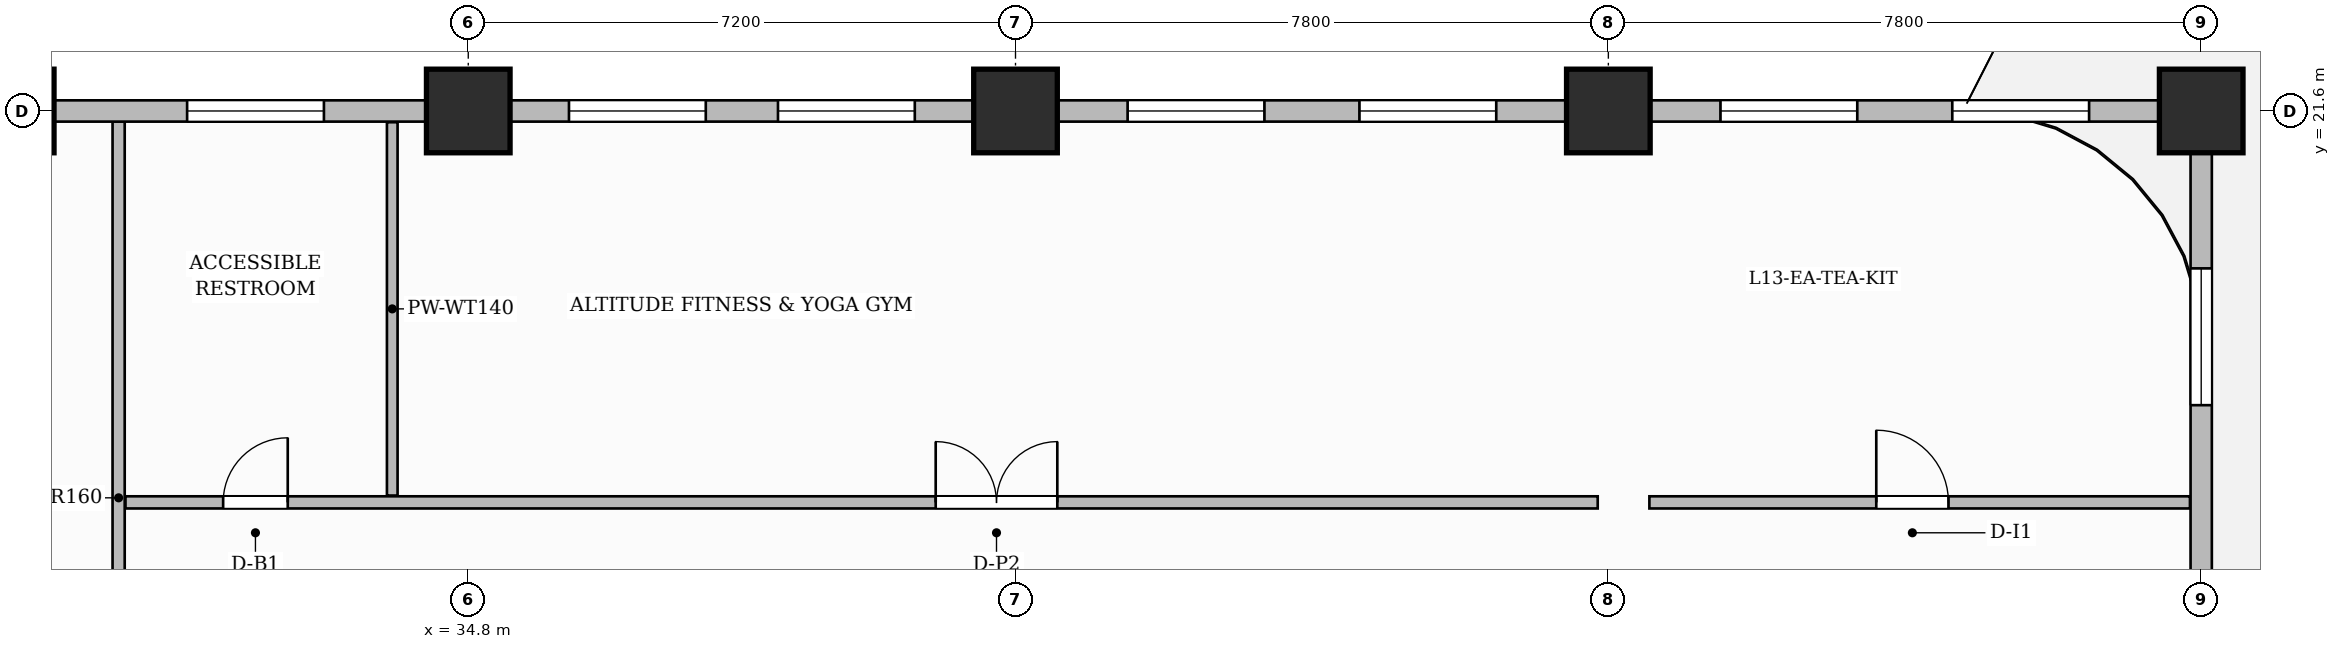
"""IFC4 building model, lengths in metres.
Left out: names, types, materials, properties, quantities, classifications, styles, units other than length and angle.
Written with IfcOpenShell. Run it as: python <this file> out.ifc"""

import sys

from ifc_helpers import new_model, si_unit, direction, frame, frame_2d, origin, origin_2d, place, context, subcontext, project, spatial, rectangle, extrude, source, transform, mapped, element, fill, save


model = new_model("IFC4")
c1 = context("Model", 3, precision=1e-05, world=origin(), true_north=direction((0.0, 1.0)))
c2 = subcontext(c1, "Body", "Model", "MODEL_VIEW")
j1 = project(units=[si_unit("LENGTHUNIT", "METRE"), si_unit("PLANEANGLEUNIT", "RADIAN")], contexts=[c1])
p1 = place(None, origin())
s1 = spatial("IfcSite", under=j1, at=p1, CompositionType="ELEMENT")
p2 = place(p1, origin())
s2 = spatial("IfcBuilding", under=s1, at=p2, CompositionType="ELEMENT")
p3 = place(p2, frame((0.0, 0.0, 58.3)))
s3 = spatial("IfcBuildingStorey", under=s2, at=p3, CompositionType="ELEMENT", Elevation=58.3)
m1 = source(origin(), c2, "Body", "SweptSolid", [
    extrude(rectangle(XDim=1.1, YDim=1.1, at=origin_2d()), origin(), (0.0, 0.0, 1.0), 3.7),
])
for number, where, z_axis, x_axis in (
    (1, (28.8, 21.6, 0.0), (0.0, 0.0, 1.0), (1.0, 0.0, 0.0)),
    (2, (34.8, 21.6, 0.0), (0.0, 0.0, 1.0), (1.0, 0.0, 0.0)),
    (3, (42.0, 21.6, 0.0), (0.0, 0.0, 1.0), (1.0, 0.0, 0.0)),
    (4, (49.8, 21.6, 0.0), (0.0, 0.0, 1.0), (1.0, 0.0, 0.0)),
    (5, (57.6, 21.6, 0.0), (0.0, 0.0, 1.0), (1.0, 0.0, 0.0)),
):
    element("IfcColumn", number, at=place(p3, frame(where, z_axis=z_axis, x_axis=x_axis)), inside=s3, PredefinedType="COLUMN", context=c2, shape_type="MappedRepresentation", body=[
        mapped(m1, transform((0.0, 0.0, 0.0), scale=1.0)),
    ])
p4 = place(p3, frame((30.2, 11.56, 0.0), z_axis=(0.0, 0.0, 1.0), x_axis=(0.0, 1.0, 0.0)))
e6 = element("IfcWall", 6, at=p4, inside=s3, PredefinedType="PARTITIONING", context=c2, shape_type="SweptSolid", body=[
    extrude(rectangle(XDim=9.9, YDim=0.16, at=frame_2d((4.95, 0.0))), origin(), (0.0, 0.0, 1.0), 3.45),
])
p5 = place(p3, frame((30.29, 16.45, 0.0), z_axis=(0.0, 0.0, 1.0), x_axis=(1.0, 0.0, 0.0)))
e7 = element("IfcWall", 7, at=p5, inside=s3, PredefinedType="PARTITIONING", context=c2, shape_type="SweptSolid", body=[
    extrude(rectangle(XDim=19.37, YDim=0.16, at=frame_2d((9.685, 0.0))), origin(), (0.0, 0.0, 1.0), 3.45),
])
p6 = place(p5, frame((1.285, 0.0, 0.0)))
e8 = element("IfcOpeningElement", 8, at=p6, cuts=e7, PredefinedType="OPENING", context=c2, shape_type="SweptSolid", body=[
    extrude(rectangle(XDim=0.85, YDim=2.1, at=frame_2d((0.425, 1.05))), frame((0.0, 0.09, 0.0), z_axis=(0.0, -1.0, 0.0), x_axis=(1.0, 0.0, 0.0)), (0.0, 0.0, 1.0), 0.18),
])
p7 = place(p5, frame((10.66, 0.0, 0.0)))
e9 = element("IfcOpeningElement", 9, at=p7, cuts=e7, PredefinedType="OPENING", context=c2, shape_type="SweptSolid", body=[
    extrude(rectangle(XDim=1.6, YDim=2.4, at=frame_2d((0.8, 1.2))), frame((0.0, 0.09, 0.0), z_axis=(0.0, -1.0, 0.0), x_axis=(1.0, 0.0, 0.0)), (0.0, 0.0, 1.0), 0.18),
])
p8 = place(p3, frame((50.34, 16.45, 0.0), z_axis=(0.0, 0.0, 1.0), x_axis=(1.0, 0.0, 0.0)))
e10 = element("IfcWall", 10, at=p8, inside=s3, PredefinedType="PARTITIONING", context=c2, shape_type="SweptSolid", body=[
    extrude(rectangle(XDim=7.112, YDim=0.16, at=frame_2d((3.556, 0.0))), origin(), (0.0, 0.0, 1.0), 3.45),
])
p9 = place(p8, frame((2.985, 0.0, 0.0)))
e11 = element("IfcOpeningElement", 11, at=p9, cuts=e10, PredefinedType="OPENING", context=c2, shape_type="SweptSolid", body=[
    extrude(rectangle(XDim=0.95, YDim=2.15, at=frame_2d((0.475, 1.075))), frame((0.0, 0.09, 0.0), z_axis=(0.0, -1.0, 0.0), x_axis=(1.0, 0.0, 0.0)), (0.0, 0.0, 1.0), 0.18),
])
p10 = place(p3, frame((33.8, 16.54, 0.0), z_axis=(0.0, 0.0, 1.0), x_axis=(0.0, 1.0, 0.0)))
e12 = element("IfcWall", 12, at=p10, inside=s3, PredefinedType="PARTITIONING", context=c2, shape_type="SweptSolid", body=[
    extrude(rectangle(XDim=4.912, YDim=0.14, at=frame_2d((2.456, 0.0))), origin(), (0.0, 0.0, 1.0), 3.45),
])
p11 = place(p3, frame((57.6, 0.05, 0.0), z_axis=(0.0, 0.0, 1.0), x_axis=(0.0, 1.0, 0.0)))
e13 = element("IfcWall", 13, at=p11, inside=s3, PredefinedType="SOLIDWALL", context=c2, shape_type="SweptSolid", body=[
    extrude(rectangle(XDim=21.5, YDim=0.28, at=frame_2d((10.75, 0.0))), origin(), (0.0, 0.0, 1.0), 2.885),
])
p12 = place(p11, frame((2.75, 0.0, 0.0)))
e14 = element("IfcOpeningElement", 14, at=p12, cuts=e13, PredefinedType="OPENING", context=c2, shape_type="SweptSolid", body=[
    extrude(rectangle(XDim=1.2, YDim=2.2, at=frame_2d((0.6, 1.1))), frame((0.0, 0.15, 0.0), z_axis=(0.0, -1.0, 0.0), x_axis=(1.0, 0.0, 0.0)), (0.0, 0.0, 1.0), 0.3),
])
p13 = place(p11, frame((1.025, 0.0, 0.8)))
e15 = element("IfcOpeningElement", 15, at=p13, cuts=e13, PredefinedType="OPENING", context=c2, shape_type="SweptSolid", body=[
    extrude(rectangle(XDim=1.15, YDim=1.8, at=frame_2d((0.575, 0.9))), frame((0.0, 0.15, 0.0), z_axis=(0.0, -1.0, 0.0), x_axis=(1.0, 0.0, 0.0)), (0.0, 0.0, 1.0), 0.3),
])
p14 = place(p11, frame((4.6, 0.0, 0.8)))
e16 = element("IfcOpeningElement", 16, at=p14, cuts=e13, PredefinedType="OPENING", context=c2, shape_type="SweptSolid", body=[
    extrude(rectangle(XDim=1.4, YDim=1.85, at=frame_2d((0.7, 0.925))), frame((0.0, 0.15, 0.0), z_axis=(0.0, -1.0, 0.0), x_axis=(1.0, 0.0, 0.0)), (0.0, 0.0, 1.0), 0.3),
])
p15 = place(p11, frame((8.475, 0.0, 0.8)))
e17 = element("IfcOpeningElement", 17, at=p15, cuts=e13, PredefinedType="OPENING", context=c2, shape_type="SweptSolid", body=[
    extrude(rectangle(XDim=1.8, YDim=1.85, at=frame_2d((0.9, 0.925))), frame((0.0, 0.15, 0.0), z_axis=(0.0, -1.0, 0.0), x_axis=(1.0, 0.0, 0.0)), (0.0, 0.0, 1.0), 0.3),
])
p16 = place(p11, frame((11.225, 0.0, 0.8)))
e18 = element("IfcOpeningElement", 18, at=p16, cuts=e13, PredefinedType="OPENING", context=c2, shape_type="SweptSolid", body=[
    extrude(rectangle(XDim=1.8, YDim=1.85, at=frame_2d((0.9, 0.925))), frame((0.0, 0.15, 0.0), z_axis=(0.0, -1.0, 0.0), x_axis=(1.0, 0.0, 0.0)), (0.0, 0.0, 1.0), 0.3),
])
p17 = place(p11, frame((17.679, 0.0, 0.8)))
e19 = element("IfcOpeningElement", 19, at=p17, cuts=e13, PredefinedType="OPENING", context=c2, shape_type="SweptSolid", body=[
    extrude(rectangle(XDim=1.8, YDim=1.85, at=frame_2d((0.9, 0.925))), frame((0.0, 0.15, 0.0), z_axis=(0.0, -1.0, 0.0), x_axis=(1.0, 0.0, 0.0)), (0.0, 0.0, 1.0), 0.3),
])
p18 = place(p3, frame((14.4, 21.6, 0.0), z_axis=(0.0, 0.0, 1.0), x_axis=(1.0, 0.0, 0.0)))
e20 = element("IfcWall", 20, at=p18, inside=s3, PredefinedType="SOLIDWALL", context=c2, shape_type="SweptSolid", body=[
    extrude(rectangle(XDim=43.2, YDim=0.28, at=frame_2d((21.6, 0.0))), origin(), (0.0, 0.0, 1.0), 2.885),
])
p19 = place(p18, frame((1.5, 0.0, 0.0)))
e21 = element("IfcOpeningElement", 21, at=p19, cuts=e20, PredefinedType="OPENING", context=c2, shape_type="SweptSolid", body=[
    extrude(rectangle(XDim=1.2, YDim=2.2, at=frame_2d((0.6, 1.1))), frame((0.0, 0.15, 0.0), z_axis=(0.0, -1.0, 0.0), x_axis=(1.0, 0.0, 0.0)), (0.0, 0.0, 1.0), 0.3),
])
p20 = place(p18, frame((3.8, 0.0, 0.8)))
e22 = element("IfcOpeningElement", 22, at=p20, cuts=e20, PredefinedType="OPENING", context=c2, shape_type="SweptSolid", body=[
    extrude(rectangle(XDim=1.8, YDim=1.85, at=frame_2d((0.9, 0.925))), frame((0.0, 0.15, 0.0), z_axis=(0.0, -1.0, 0.0), x_axis=(1.0, 0.0, 0.0)), (0.0, 0.0, 1.0), 0.3),
])
p21 = place(p18, frame((8.246, 0.0, 0.8)))
e23 = element("IfcOpeningElement", 23, at=p21, cuts=e20, PredefinedType="OPENING", context=c2, shape_type="SweptSolid", body=[
    extrude(rectangle(XDim=0.95, YDim=1.75, at=frame_2d((0.475, 0.875))), frame((0.0, 0.15, 0.0), z_axis=(0.0, -1.0, 0.0), x_axis=(1.0, 0.0, 0.0)), (0.0, 0.0, 1.0), 0.3),
])
p22 = place(p18, frame((10.629, 0.0, 0.8)))
e24 = element("IfcOpeningElement", 24, at=p22, cuts=e20, PredefinedType="OPENING", context=c2, shape_type="SweptSolid", body=[
    extrude(rectangle(XDim=1.8, YDim=1.85, at=frame_2d((0.9, 0.925))), frame((0.0, 0.15, 0.0), z_axis=(0.0, -1.0, 0.0), x_axis=(1.0, 0.0, 0.0)), (0.0, 0.0, 1.0), 0.3),
])
p23 = place(p18, frame((16.701, 0.0, 0.8)))
e25 = element("IfcOpeningElement", 25, at=p23, cuts=e20, PredefinedType="OPENING", context=c2, shape_type="SweptSolid", body=[
    extrude(rectangle(XDim=1.8, YDim=1.85, at=frame_2d((0.9, 0.925))), frame((0.0, 0.15, 0.0), z_axis=(0.0, -1.0, 0.0), x_axis=(1.0, 0.0, 0.0)), (0.0, 0.0, 1.0), 0.3),
])
p24 = place(p18, frame((21.725, 0.0, 0.8)))
e26 = element("IfcOpeningElement", 26, at=p24, cuts=e20, PredefinedType="OPENING", context=c2, shape_type="SweptSolid", body=[
    extrude(rectangle(XDim=1.8, YDim=1.85, at=frame_2d((0.9, 0.925))), frame((0.0, 0.15, 0.0), z_axis=(0.0, -1.0, 0.0), x_axis=(1.0, 0.0, 0.0)), (0.0, 0.0, 1.0), 0.3),
])
p25 = place(p18, frame((24.475, 0.0, 0.8)))
e27 = element("IfcOpeningElement", 27, at=p25, cuts=e20, PredefinedType="OPENING", context=c2, shape_type="SweptSolid", body=[
    extrude(rectangle(XDim=1.8, YDim=1.85, at=frame_2d((0.9, 0.925))), frame((0.0, 0.15, 0.0), z_axis=(0.0, -1.0, 0.0), x_axis=(1.0, 0.0, 0.0)), (0.0, 0.0, 1.0), 0.3),
])
p26 = place(p18, frame((29.075, 0.0, 0.8)))
e28 = element("IfcOpeningElement", 28, at=p26, cuts=e20, PredefinedType="OPENING", context=c2, shape_type="SweptSolid", body=[
    extrude(rectangle(XDim=1.8, YDim=1.85, at=frame_2d((0.9, 0.925))), frame((0.0, 0.15, 0.0), z_axis=(0.0, -1.0, 0.0), x_axis=(1.0, 0.0, 0.0)), (0.0, 0.0, 1.0), 0.3),
])
p27 = place(p18, frame((32.125, 0.0, 0.8)))
e29 = element("IfcOpeningElement", 29, at=p27, cuts=e20, PredefinedType="OPENING", context=c2, shape_type="SweptSolid", body=[
    extrude(rectangle(XDim=1.8, YDim=1.85, at=frame_2d((0.9, 0.925))), frame((0.0, 0.15, 0.0), z_axis=(0.0, -1.0, 0.0), x_axis=(1.0, 0.0, 0.0)), (0.0, 0.0, 1.0), 0.3),
])
p28 = place(p18, frame((36.875, 0.0, 0.8)))
e30 = element("IfcOpeningElement", 30, at=p28, cuts=e20, PredefinedType="OPENING", context=c2, shape_type="SweptSolid", body=[
    extrude(rectangle(XDim=1.8, YDim=1.85, at=frame_2d((0.9, 0.925))), frame((0.0, 0.15, 0.0), z_axis=(0.0, -1.0, 0.0), x_axis=(1.0, 0.0, 0.0)), (0.0, 0.0, 1.0), 0.3),
])
p29 = place(p18, frame((39.925, 0.0, 0.8)))
e31 = element("IfcOpeningElement", 31, at=p29, cuts=e20, PredefinedType="OPENING", context=c2, shape_type="SweptSolid", body=[
    extrude(rectangle(XDim=1.8, YDim=1.85, at=frame_2d((0.9, 0.925))), frame((0.0, 0.15, 0.0), z_axis=(0.0, -1.0, 0.0), x_axis=(1.0, 0.0, 0.0)), (0.0, 0.0, 1.0), 0.3),
])
m2 = source(origin(), c2, "Body", "SweptSolid", [
    extrude(rectangle(XDim=0.95, YDim=2.15, at=frame_2d((0.475, 1.075))), frame((0.0, 0.025, 0.0), z_axis=(0.0, -1.0, 0.0), x_axis=(1.0, 0.0, 0.0)), (0.0, 0.0, 1.0), 0.05),
])
p30 = place(p9, origin())
e32 = element("IfcDoor", 32, at=p30, inside=s3, OperationType="SINGLE_SWING_LEFT", PredefinedType="DOOR", context=c2, shape_type="MappedRepresentation", body=[
    mapped(m2, transform((0.0, 0.0, 0.0), scale=1.0)),
])
fill(e11, e32)
m3 = source(origin(), c2, "Body", "SweptSolid", [
    extrude(rectangle(XDim=0.85, YDim=2.1, at=frame_2d((0.425, 1.05))), frame((0.0, 0.025, 0.0), z_axis=(0.0, -1.0, 0.0), x_axis=(1.0, 0.0, 0.0)), (0.0, 0.0, 1.0), 0.05),
])
p31 = place(p6, origin())
e33 = element("IfcDoor", 33, at=p31, inside=s3, OperationType="SINGLE_SWING_RIGHT", PredefinedType="DOOR", context=c2, shape_type="MappedRepresentation", body=[
    mapped(m3, transform((0.0, 0.0, 0.0), scale=1.0)),
])
fill(e8, e33)
m4 = source(origin(), c2, "Body", "SweptSolid", [
    extrude(rectangle(XDim=1.6, YDim=2.4, at=frame_2d((0.8, 1.2))), frame((0.0, 0.025, 0.0), z_axis=(0.0, -1.0, 0.0), x_axis=(1.0, 0.0, 0.0)), (0.0, 0.0, 1.0), 0.05),
])
p32 = place(p7, origin())
e34 = element("IfcDoor", 34, at=p32, inside=s3, OperationType="DOUBLE_DOOR_SINGLE_SWING", PredefinedType="DOOR", context=c2, shape_type="MappedRepresentation", body=[
    mapped(m4, transform((0.0, 0.0, 0.0), scale=1.0)),
])
fill(e9, e34)
m5 = source(origin(), c2, "Body", "SweptSolid", [
    extrude(rectangle(XDim=1.8, YDim=1.85, at=frame_2d((0.9, 0.925))), frame((0.0, 0.03, 0.0), z_axis=(0.0, -1.0, 0.0), x_axis=(1.0, 0.0, 0.0)), (0.0, 0.0, 1.0), 0.06),
])
p33 = place(p17, origin())
e35 = element("IfcWindow", 35, at=p33, inside=s3, PartitioningType="DOUBLE_PANEL_VERTICAL", PredefinedType="WINDOW", context=c2, shape_type="MappedRepresentation", body=[
    mapped(m5, transform((0.0, 0.0, 0.0), scale=1.0)),
])
fill(e19, e35)
p34 = place(p23, origin())
e36 = element("IfcWindow", 36, at=p34, inside=s3, PartitioningType="DOUBLE_PANEL_VERTICAL", PredefinedType="WINDOW", context=c2, shape_type="MappedRepresentation", body=[
    mapped(m5, transform((0.0, 0.0, 0.0), scale=1.0)),
])
fill(e25, e36)
p35 = place(p24, origin())
e37 = element("IfcWindow", 37, at=p35, inside=s3, PartitioningType="DOUBLE_PANEL_VERTICAL", PredefinedType="WINDOW", context=c2, shape_type="MappedRepresentation", body=[
    mapped(m5, transform((0.0, 0.0, 0.0), scale=1.0)),
])
fill(e26, e37)
p36 = place(p25, origin())
e38 = element("IfcWindow", 38, at=p36, inside=s3, PartitioningType="DOUBLE_PANEL_VERTICAL", PredefinedType="WINDOW", context=c2, shape_type="MappedRepresentation", body=[
    mapped(m5, transform((0.0, 0.0, 0.0), scale=1.0)),
])
fill(e27, e38)
p37 = place(p26, origin())
e39 = element("IfcWindow", 39, at=p37, inside=s3, PartitioningType="DOUBLE_PANEL_VERTICAL", PredefinedType="WINDOW", context=c2, shape_type="MappedRepresentation", body=[
    mapped(m5, transform((0.0, 0.0, 0.0), scale=1.0)),
])
fill(e28, e39)
p38 = place(p27, origin())
e40 = element("IfcWindow", 40, at=p38, inside=s3, PartitioningType="DOUBLE_PANEL_VERTICAL", PredefinedType="WINDOW", context=c2, shape_type="MappedRepresentation", body=[
    mapped(m5, transform((0.0, 0.0, 0.0), scale=1.0)),
])
fill(e29, e40)
p39 = place(p28, origin())
e41 = element("IfcWindow", 41, at=p39, inside=s3, PartitioningType="DOUBLE_PANEL_VERTICAL", PredefinedType="WINDOW", context=c2, shape_type="MappedRepresentation", body=[
    mapped(m5, transform((0.0, 0.0, 0.0), scale=1.0)),
])
fill(e30, e41)
p40 = place(p29, origin())
e42 = element("IfcWindow", 42, at=p40, inside=s3, PartitioningType="DOUBLE_PANEL_VERTICAL", PredefinedType="WINDOW", context=c2, shape_type="MappedRepresentation", body=[
    mapped(m5, transform((0.0, 0.0, 0.0), scale=1.0)),
])
fill(e31, e42)
save(model, sys.argv[1])
